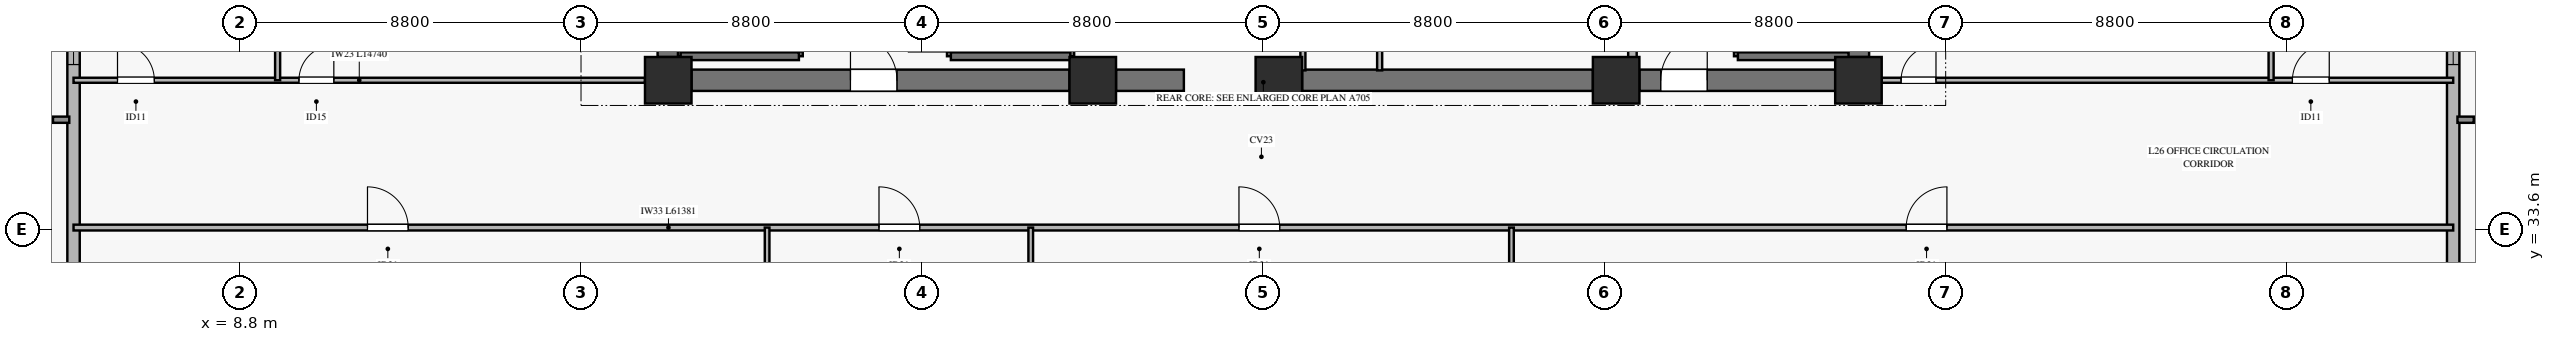
"""IFC4 building model, lengths in metres.
Left out: names, types, materials, properties, quantities, classifications, styles, units other than length and angle.
Written with IfcOpenShell. Run it as: python <this file> out.ifc"""

import sys

from ifc_helpers import new_model, si_unit, direction, frame, frame_2d, origin, origin_2d, place, context, subcontext, project, spatial, rectangle, extrude, source, transform, mapped, element, fill, save


model = new_model("IFC4")
c1 = context("Model", 3, precision=1e-05, world=origin(), true_north=direction((0.0, 1.0)))
c2 = subcontext(c1, "Body", "Model", "MODEL_VIEW")
j1 = project(units=[si_unit("LENGTHUNIT", "METRE"), si_unit("PLANEANGLEUNIT", "RADIAN")], contexts=[c1])
p1 = place(None, origin())
s1 = spatial("IfcSite", under=j1, at=p1, CompositionType="ELEMENT")
p2 = place(p1, origin())
s2 = spatial("IfcBuilding", under=s1, at=p2, CompositionType="ELEMENT")
p3 = place(p2, frame((0.0, 0.0, 107.5)))
s3 = spatial("IfcBuildingStorey", under=s2, at=p3, CompositionType="ELEMENT", Elevation=107.5)
m1 = source(origin(), c2, "Body", "SweptSolid", [
    extrude(rectangle(XDim=1.2, YDim=1.2, at=origin_2d()), origin(), (0.0, 0.0, 1.0), 3.68),
])
for number, where, z_axis, x_axis in (
    (1, (19.85, 37.45, 0.0), (0.0, 0.0, 1.0), (1.0, 0.0, 0.0)),
    (2, (30.8, 37.45, 0.0), (0.0, 0.0, 1.0), (1.0, 0.0, 0.0)),
    (3, (35.6, 37.45, 0.0), (0.0, 0.0, 1.0), (1.0, 0.0, 0.0)),
    (4, (44.3, 37.45, 0.0), (0.0, 0.0, 1.0), (1.0, 0.0, 0.0)),
    (5, (50.55, 37.45, 0.0), (0.0, 0.0, 1.0), (1.0, 0.0, 0.0)),
):
    element("IfcColumn", number, at=place(p3, frame(where, z_axis=z_axis, x_axis=x_axis)), inside=s3, PredefinedType="PILASTER", context=c2, shape_type="MappedRepresentation", body=[
        mapped(m1, transform((0.0, 0.0, 0.0), x_axis=(1.0, 0.0, 0.0), y_axis=(0.0, 1.0, 0.0), z_axis=(0.0, 0.0, 1.0), scale=1.0)),
    ])
p4 = place(p3, frame((20.45, 37.45, 0.0), z_axis=(0.0, 0.0, 1.0), x_axis=(1.0, 0.0, 0.0)))
e6 = element("IfcWall", 6, at=p4, inside=s3, PredefinedType="SHEAR", context=c2, shape_type="SweptSolid", body=[
    extrude(rectangle(XDim=9.75, YDim=0.55, at=frame_2d((4.875, 0.0))), origin(), (0.0, 0.0, 1.0), 3.68),
])
p5 = place(p4, frame((4.1, 0.0, 0.0)))
e7 = element("IfcOpeningElement", 7, at=p5, cuts=e6, PredefinedType="OPENING", context=c2, shape_type="SweptSolid", body=[
    extrude(rectangle(XDim=1.2, YDim=2.15, at=frame_2d((0.6, 1.075))), frame((0.0, 0.285, 0.0), z_axis=(0.0, -1.0, 0.0), x_axis=(1.0, 0.0, 0.0)), (0.0, 0.0, 1.0), 0.57),
])
p6 = place(p3, frame((31.4, 37.45, 0.0), z_axis=(0.0, 0.0, 1.0), x_axis=(1.0, 0.0, 0.0)))
e8 = element("IfcWall", 8, at=p6, inside=s3, PredefinedType="SHEAR", context=c2, shape_type="SweptSolid", body=[
    extrude(rectangle(XDim=1.75, YDim=0.55, at=frame_2d((0.875, 0.0))), origin(), (0.0, 0.0, 1.0), 3.68),
])
p7 = place(p3, frame((36.2, 37.45, 0.0), z_axis=(0.0, 0.0, 1.0), x_axis=(1.0, 0.0, 0.0)))
e9 = element("IfcWall", 9, at=p7, inside=s3, PredefinedType="SHEAR", context=c2, shape_type="SweptSolid", body=[
    extrude(rectangle(XDim=7.5, YDim=0.55, at=frame_2d((3.75, 0.0))), origin(), (0.0, 0.0, 1.0), 3.68),
])
p8 = place(p3, frame((44.9, 37.45, 0.0), z_axis=(0.0, 0.0, 1.0), x_axis=(1.0, 0.0, 0.0)))
e10 = element("IfcWall", 10, at=p8, inside=s3, PredefinedType="SHEAR", context=c2, shape_type="SweptSolid", body=[
    extrude(rectangle(XDim=5.05, YDim=0.55, at=frame_2d((2.525, 0.0))), origin(), (0.0, 0.0, 1.0), 3.68),
])
p9 = place(p8, frame((0.55, 0.0, 0.0)))
e11 = element("IfcOpeningElement", 11, at=p9, cuts=e10, PredefinedType="OPENING", context=c2, shape_type="SweptSolid", body=[
    extrude(rectangle(XDim=1.2, YDim=2.15, at=frame_2d((0.6, 1.075))), frame((0.0, 0.285, 0.0), z_axis=(0.0, -1.0, 0.0), x_axis=(1.0, 0.0, 0.0)), (0.0, 0.0, 1.0), 0.57),
])
for number, where, z_axis, x_axis in (
    (12, (19.85, 38.05, 0.0), (0.0, 0.0, 1.0), (0.0, 1.0, 0.0)),
    (13, (50.55, 38.05, 0.0), (0.0, 0.0, 1.0), (0.0, 1.0, 0.0)),
):
    element("IfcWall", number, at=place(p3, frame(where, z_axis=z_axis, x_axis=x_axis)), inside=s3, PredefinedType="SHEAR", context=c2, shape_type="SweptSolid", body=[
        extrude(rectangle(XDim=7.9, YDim=0.55, at=frame_2d((3.95, 0.0))), origin(), (0.0, 0.0, 1.0), 3.68),
    ])
p10 = place(p3, frame((4.51, 26.73, 0.0), z_axis=(0.0, 0.0, 1.0), x_axis=(0.0, 1.0, 0.0)))
e14 = element("IfcWall", 14, at=p10, inside=s3, PredefinedType="SOLIDWALL", context=c2, shape_type="SweptSolid", body=[
    extrude(rectangle(XDim=16.326, YDim=0.32, at=frame_2d((8.163, 0.0))), origin(), (0.0, 0.0, 1.0), 3.16),
])
p11 = place(p10, frame((11.125, 0.0, 0.45)))
e15 = element("IfcOpeningElement", 15, at=p11, cuts=e14, PredefinedType="OPENING", context=c2, shape_type="SweptSolid", body=[
    extrude(rectangle(XDim=2.4, YDim=2.1, at=frame_2d((1.2, 1.05))), frame((0.0, 0.17, 0.0), z_axis=(0.0, -1.0, 0.0), x_axis=(1.0, 0.0, 0.0)), (0.0, 0.0, 1.0), 0.34),
])
p12 = place(p3, frame((65.891, 26.73, 0.0), z_axis=(0.0, 0.0, 1.0), x_axis=(0.0, 1.0, 0.0)))
e16 = element("IfcWall", 16, at=p12, inside=s3, PredefinedType="SOLIDWALL", context=c2, shape_type="SweptSolid", body=[
    extrude(rectangle(XDim=16.326, YDim=0.32, at=frame_2d((8.163, 0.0))), origin(), (0.0, 0.0, 1.0), 3.16),
])
p13 = place(p12, frame((11.125, 0.0, 0.45)))
e17 = element("IfcOpeningElement", 17, at=p13, cuts=e16, PredefinedType="OPENING", context=c2, shape_type="SweptSolid", body=[
    extrude(rectangle(XDim=2.4, YDim=2.1, at=frame_2d((1.2, 1.05))), frame((0.0, 0.17, 0.0), z_axis=(0.0, -1.0, 0.0), x_axis=(1.0, 0.0, 0.0)), (0.0, 0.0, 1.0), 0.34),
])
p14 = place(p3, frame((20.17, 38.07, 0.0), z_axis=(0.0, 0.0, 1.0), x_axis=(0.0, 1.0, 0.0)))
e18 = element("IfcWall", 18, at=p14, inside=s3, PredefinedType="SOLIDWALL", context=c2, shape_type="SweptSolid", body=[
    extrude(rectangle(XDim=7.25, YDim=0.14, at=frame_2d((3.625, 0.0))), origin(), (0.0, 0.0, 1.0), 3.9),
])
p15 = place(p3, frame((23.22, 38.07, 0.0), z_axis=(0.0, 0.0, 1.0), x_axis=(0.0, 1.0, 0.0)))
e19 = element("IfcWall", 19, at=p15, inside=s3, PredefinedType="SOLIDWALL", context=c2, shape_type="SweptSolid", body=[
    extrude(rectangle(XDim=7.25, YDim=0.2, at=frame_2d((3.625, 0.0))), origin(), (0.0, 0.0, 1.0), 3.9),
])
p16 = place(p15, frame((0.11, 0.0, 0.0)))
e20 = element("IfcOpeningElement", 20, at=p16, cuts=e19, PredefinedType="OPENING", context=c2, shape_type="SweptSolid", body=[
    extrude(rectangle(XDim=1.1, YDim=2.15, at=frame_2d((0.55, 1.075))), frame((0.0, 0.11, 0.0), z_axis=(0.0, -1.0, 0.0), x_axis=(1.0, 0.0, 0.0)), (0.0, 0.0, 1.0), 0.22),
])
p17 = place(p3, frame((20.17, 38.07, 0.0), z_axis=(0.0, 0.0, 1.0), x_axis=(1.0, 0.0, 0.0)))
e21 = element("IfcWall", 21, at=p17, inside=s3, PredefinedType="SOLIDWALL", context=c2, shape_type="SweptSolid", body=[
    extrude(rectangle(XDim=3.05, YDim=0.2, at=frame_2d((1.525, 0.0))), origin(), (0.0, 0.0, 1.0), 3.9),
])
p18 = place(p3, frame((27.14, 38.07, 0.0), z_axis=(0.0, 0.0, 1.0), x_axis=(0.0, 1.0, 0.0)))
e22 = element("IfcWall", 22, at=p18, inside=s3, PredefinedType="SOLIDWALL", context=c2, shape_type="SweptSolid", body=[
    extrude(rectangle(XDim=7.25, YDim=0.2, at=frame_2d((3.625, 0.0))), origin(), (0.0, 0.0, 1.0), 3.9),
])
p19 = place(p18, frame((0.11, 0.0, 0.0)))
e23 = element("IfcOpeningElement", 23, at=p19, cuts=e22, PredefinedType="OPENING", context=c2, shape_type="SweptSolid", body=[
    extrude(rectangle(XDim=1.1, YDim=2.15, at=frame_2d((0.55, 1.075))), frame((0.0, 0.11, 0.0), z_axis=(0.0, -1.0, 0.0), x_axis=(1.0, 0.0, 0.0)), (0.0, 0.0, 1.0), 0.22),
])
p20 = place(p3, frame((30.22, 38.07, 0.0), z_axis=(0.0, 0.0, 1.0), x_axis=(0.0, 1.0, 0.0)))
e24 = element("IfcWall", 24, at=p20, inside=s3, PredefinedType="SOLIDWALL", context=c2, shape_type="SweptSolid", body=[
    extrude(rectangle(XDim=7.25, YDim=0.2, at=frame_2d((3.625, 0.0))), origin(), (0.0, 0.0, 1.0), 3.9),
])
p21 = place(p3, frame((27.14, 38.07, 0.0), z_axis=(0.0, 0.0, 1.0), x_axis=(1.0, 0.0, 0.0)))
e25 = element("IfcWall", 25, at=p21, inside=s3, PredefinedType="SOLIDWALL", context=c2, shape_type="SweptSolid", body=[
    extrude(rectangle(XDim=3.08, YDim=0.2, at=frame_2d((1.54, 0.0))), origin(), (0.0, 0.0, 1.0), 3.9),
])
p22 = place(p3, frame((47.44, 38.07, 0.0), z_axis=(0.0, 0.0, 1.0), x_axis=(0.0, 1.0, 0.0)))
e26 = element("IfcWall", 26, at=p22, inside=s3, PredefinedType="SOLIDWALL", context=c2, shape_type="SweptSolid", body=[
    extrude(rectangle(XDim=7.25, YDim=0.2, at=frame_2d((3.625, 0.0))), origin(), (0.0, 0.0, 1.0), 3.9),
])
p23 = place(p22, frame((0.11, 0.0, 0.0)))
e27 = element("IfcOpeningElement", 27, at=p23, cuts=e26, PredefinedType="OPENING", context=c2, shape_type="SweptSolid", body=[
    extrude(rectangle(XDim=1.1, YDim=2.15, at=frame_2d((0.55, 1.075))), frame((0.0, 0.11, 0.0), z_axis=(0.0, -1.0, 0.0), x_axis=(1.0, 0.0, 0.0)), (0.0, 0.0, 1.0), 0.22),
])
p24 = place(p3, frame((47.44, 38.07, 0.0), z_axis=(0.0, 0.0, 1.0), x_axis=(1.0, 0.0, 0.0)))
e28 = element("IfcWall", 28, at=p24, inside=s3, PredefinedType="SOLIDWALL", context=c2, shape_type="SweptSolid", body=[
    extrude(rectangle(XDim=2.855, YDim=0.2, at=frame_2d((1.427, 0.0))), origin(), (0.0, 0.0, 1.0), 3.9),
])
p25 = place(p3, frame((44.72, 37.705, 0.0), z_axis=(0.0, 0.0, 1.0), x_axis=(0.0, 1.0, 0.0)))
e29 = element("IfcWall", 29, at=p25, inside=s3, PredefinedType="SOLIDWALL", context=c2, shape_type="SweptSolid", body=[
    extrude(rectangle(XDim=7.515, YDim=0.22, at=frame_2d((3.757, 0.0))), origin(), (0.0, 0.0, 1.0), 3.68),
])
p26 = place(p3, frame((36.22, 37.705, 0.0), z_axis=(0.0, 0.0, 1.0), x_axis=(0.0, 1.0, 0.0)))
e30 = element("IfcWall", 30, at=p26, inside=s3, PredefinedType="PARTITIONING", context=c2, shape_type="SweptSolid", body=[
    extrude(rectangle(XDim=2.215, YDim=0.13, at=frame_2d((1.107, 0.0))), origin(), (0.0, 0.0, 1.0), 3.68),
])
p27 = place(p26, frame((0.905, 0.0, 0.0)))
e31 = element("IfcOpeningElement", 31, at=p27, cuts=e30, PredefinedType="OPENING", context=c2, shape_type="SweptSolid", body=[
    extrude(rectangle(XDim=0.9, YDim=2.1, at=frame_2d((0.45, 1.05))), frame((0.0, 0.075, 0.0), z_axis=(0.0, -1.0, 0.0), x_axis=(1.0, 0.0, 0.0)), (0.0, 0.0, 1.0), 0.15),
])
p28 = place(p3, frame((38.2, 37.705, 0.0), z_axis=(0.0, 0.0, 1.0), x_axis=(0.0, 1.0, 0.0)))
e32 = element("IfcWall", 32, at=p28, inside=s3, PredefinedType="PARTITIONING", context=c2, shape_type="SweptSolid", body=[
    extrude(rectangle(XDim=2.215, YDim=0.13, at=frame_2d((1.107, 0.0))), origin(), (0.0, 0.0, 1.0), 3.68),
])
p29 = place(p28, frame((0.615, 0.0, 0.0)))
e33 = element("IfcOpeningElement", 33, at=p29, cuts=e32, PredefinedType="OPENING", context=c2, shape_type="SweptSolid", body=[
    extrude(rectangle(XDim=0.9, YDim=2.1, at=frame_2d((0.45, 1.05))), frame((0.0, 0.075, 0.0), z_axis=(0.0, -1.0, 0.0), x_axis=(1.0, 0.0, 0.0)), (0.0, 0.0, 1.0), 0.15),
])
p30 = place(p3, frame((4.51, 33.65, 0.0), z_axis=(0.0, 0.0, 1.0), x_axis=(1.0, 0.0, 0.0)))
e34 = element("IfcWall", 34, at=p30, inside=s3, PredefinedType="PARTITIONING", context=c2, shape_type="SweptSolid", body=[
    extrude(rectangle(XDim=61.381, YDim=0.15, at=frame_2d((30.69, 0.0))), origin(), (0.0, 0.0, 1.0), 2.765),
])
p31 = place(p30, frame((7.582, 0.0, 0.0)))
e35 = element("IfcOpeningElement", 35, at=p31, cuts=e34, PredefinedType="OPENING", context=c2, shape_type="SweptSolid", body=[
    extrude(rectangle(XDim=1.05, YDim=2.15, at=frame_2d((0.525, 1.075))), frame((0.0, 0.085, 0.0), z_axis=(0.0, -1.0, 0.0), x_axis=(1.0, 0.0, 0.0)), (0.0, 0.0, 1.0), 0.17),
])
p32 = place(p30, frame((20.776, 0.0, 0.0)))
e36 = element("IfcOpeningElement", 36, at=p32, cuts=e34, PredefinedType="OPENING", context=c2, shape_type="SweptSolid", body=[
    extrude(rectangle(XDim=1.05, YDim=2.15, at=frame_2d((0.525, 1.075))), frame((0.0, 0.085, 0.0), z_axis=(0.0, -1.0, 0.0), x_axis=(1.0, 0.0, 0.0)), (0.0, 0.0, 1.0), 0.17),
])
p33 = place(p30, frame((30.061, 0.0, 0.0)))
e37 = element("IfcOpeningElement", 37, at=p33, cuts=e34, PredefinedType="OPENING", context=c2, shape_type="SweptSolid", body=[
    extrude(rectangle(XDim=1.05, YDim=2.15, at=frame_2d((0.525, 1.075))), frame((0.0, 0.085, 0.0), z_axis=(0.0, -1.0, 0.0), x_axis=(1.0, 0.0, 0.0)), (0.0, 0.0, 1.0), 0.17),
])
p34 = place(p30, frame((47.272, 0.0, 0.0)))
e38 = element("IfcOpeningElement", 38, at=p34, cuts=e34, PredefinedType="OPENING", context=c2, shape_type="SweptSolid", body=[
    extrude(rectangle(XDim=1.05, YDim=2.15, at=frame_2d((0.525, 1.075))), frame((0.0, 0.085, 0.0), z_axis=(0.0, -1.0, 0.0), x_axis=(1.0, 0.0, 0.0)), (0.0, 0.0, 1.0), 0.17),
])
for number, where, z_axis, x_axis in (
    (39, (22.4, 6.462, 0.0), (0.0, 0.0, 1.0), (0.0, 1.0, 0.0)),
    (40, (29.2, 6.462, 0.0), (0.0, 0.0, 1.0), (0.0, 1.0, 0.0)),
    (41, (41.6, 6.462, 0.0), (0.0, 0.0, 1.0), (0.0, 1.0, 0.0)),
):
    element("IfcWall", number, at=place(p3, frame(where, z_axis=z_axis, x_axis=x_axis)), inside=s3, PredefinedType="PARTITIONING", context=c2, shape_type="SweptSolid", body=[
        extrude(rectangle(XDim=27.188, YDim=0.12, at=frame_2d((13.594, 0.0))), origin(), (0.0, 0.0, 1.0), 3.165),
    ])
p35 = place(p3, frame((4.51, 37.45, 0.0), z_axis=(0.0, 0.0, 1.0), x_axis=(1.0, 0.0, 0.0)))
e42 = element("IfcWall", 42, at=p35, inside=s3, PredefinedType="PARTITIONING", context=c2, shape_type="SweptSolid", body=[
    extrude(rectangle(XDim=14.74, YDim=0.13, at=frame_2d((7.37, 0.0))), origin(), (0.0, 0.0, 1.0), 3.165),
])
p36 = place(p35, frame((1.134, 0.0, 0.0)))
e43 = element("IfcOpeningElement", 43, at=p36, cuts=e42, PredefinedType="OPENING", context=c2, shape_type="SweptSolid", body=[
    extrude(rectangle(XDim=0.95, YDim=2.1, at=frame_2d((0.475, 1.05))), frame((0.0, 0.075, 0.0), z_axis=(0.0, -1.0, 0.0), x_axis=(1.0, 0.0, 0.0)), (0.0, 0.0, 1.0), 0.15),
])
p37 = place(p35, frame((5.814, 0.0, 0.0)))
e44 = element("IfcOpeningElement", 44, at=p37, cuts=e42, PredefinedType="OPENING", context=c2, shape_type="SweptSolid", body=[
    extrude(rectangle(XDim=0.9, YDim=2.1, at=frame_2d((0.45, 1.05))), frame((0.0, 0.075, 0.0), z_axis=(0.0, -1.0, 0.0), x_axis=(1.0, 0.0, 0.0)), (0.0, 0.0, 1.0), 0.15),
])
p38 = place(p3, frame((9.774, 37.45, 0.0), z_axis=(0.0, 0.0, 1.0), x_axis=(0.0, 1.0, 0.0)))
e45 = element("IfcWall", 45, at=p38, inside=s3, PredefinedType="PARTITIONING", context=c2, shape_type="SweptSolid", body=[
    extrude(rectangle(XDim=8.8, YDim=0.13, at=frame_2d((4.4, 0.0))), origin(), (0.0, 0.0, 1.0), 3.68),
])
p39 = place(p3, frame((51.15, 37.45, 0.0), z_axis=(0.0, 0.0, 1.0), x_axis=(1.0, 0.0, 0.0)))
e46 = element("IfcWall", 46, at=p39, inside=s3, PredefinedType="PARTITIONING", context=c2, shape_type="SweptSolid", body=[
    extrude(rectangle(XDim=14.741, YDim=0.13, at=frame_2d((7.371, 0.0))), origin(), (0.0, 0.0, 1.0), 3.165),
])
p40 = place(p39, frame((0.5, 0.0, 0.0)))
e47 = element("IfcOpeningElement", 47, at=p40, cuts=e46, PredefinedType="OPENING", context=c2, shape_type="SweptSolid", body=[
    extrude(rectangle(XDim=0.9, YDim=2.1, at=frame_2d((0.45, 1.05))), frame((0.0, 0.075, 0.0), z_axis=(0.0, -1.0, 0.0), x_axis=(1.0, 0.0, 0.0)), (0.0, 0.0, 1.0), 0.15),
])
p41 = place(p39, frame((10.594, 0.0, 0.0)))
e48 = element("IfcOpeningElement", 48, at=p41, cuts=e46, PredefinedType="OPENING", context=c2, shape_type="SweptSolid", body=[
    extrude(rectangle(XDim=0.95, YDim=2.1, at=frame_2d((0.475, 1.05))), frame((0.0, 0.075, 0.0), z_axis=(0.0, -1.0, 0.0), x_axis=(1.0, 0.0, 0.0)), (0.0, 0.0, 1.0), 0.15),
])
p42 = place(p3, frame((61.194, 37.45, 0.0), z_axis=(0.0, 0.0, 1.0), x_axis=(0.0, 1.0, 0.0)))
e49 = element("IfcWall", 49, at=p42, inside=s3, PredefinedType="PARTITIONING", context=c2, shape_type="SweptSolid", body=[
    extrude(rectangle(XDim=8.8, YDim=0.13, at=frame_2d((4.4, 0.0))), origin(), (0.0, 0.0, 1.0), 3.68),
])
m2 = source(origin(), c2, "Body", "SweptSolid", [
    extrude(rectangle(XDim=2.4, YDim=2.1, at=frame_2d((1.2, 1.05))), frame((0.0, 0.03, 0.0), z_axis=(0.0, -1.0, 0.0), x_axis=(1.0, 0.0, 0.0)), (0.0, 0.0, 1.0), 0.06),
])
p43 = place(p11, origin())
e50 = element("IfcWindow", 50, at=p43, inside=s3, PartitioningType="SINGLE_PANEL", PredefinedType="WINDOW", context=c2, shape_type="MappedRepresentation", body=[
    mapped(m2, transform((0.0, 0.0, 0.0), x_axis=(1.0, 0.0, 0.0), y_axis=(0.0, 1.0, 0.0), z_axis=(0.0, 0.0, 1.0), scale=1.0)),
])
fill(e15, e50)
p44 = place(p13, origin())
e51 = element("IfcWindow", 51, at=p44, inside=s3, PartitioningType="SINGLE_PANEL", PredefinedType="WINDOW", context=c2, shape_type="MappedRepresentation", body=[
    mapped(m2, transform((0.0, 0.0, 0.0), x_axis=(1.0, 0.0, 0.0), y_axis=(0.0, 1.0, 0.0), z_axis=(0.0, 0.0, 1.0), scale=1.0)),
])
fill(e17, e51)
m3 = source(origin(), c2, "Body", "SweptSolid", [
    extrude(rectangle(XDim=1.2, YDim=2.15, at=frame_2d((0.6, 1.075))), frame((0.0, 0.025, 0.0), z_axis=(0.0, -1.0, 0.0), x_axis=(1.0, 0.0, 0.0)), (0.0, 0.0, 1.0), 0.05),
])
p45 = place(p5, origin())
e52 = element("IfcDoor", 52, at=p45, inside=s3, OperationType="SINGLE_SWING_LEFT", PredefinedType="DOOR", context=c2, shape_type="MappedRepresentation", body=[
    mapped(m3, transform((0.0, 0.0, 0.0), x_axis=(1.0, 0.0, 0.0), y_axis=(0.0, 1.0, 0.0), z_axis=(0.0, 0.0, 1.0), scale=1.0)),
])
fill(e7, e52)
p46 = place(p9, origin())
e53 = element("IfcDoor", 53, at=p46, inside=s3, OperationType="SINGLE_SWING_RIGHT", PredefinedType="DOOR", context=c2, shape_type="MappedRepresentation", body=[
    mapped(m3, transform((0.0, 0.0, 0.0), x_axis=(1.0, 0.0, 0.0), y_axis=(0.0, 1.0, 0.0), z_axis=(0.0, 0.0, 1.0), scale=1.0)),
])
fill(e11, e53)
m4 = source(origin(), c2, "Body", "SweptSolid", [
    extrude(rectangle(XDim=1.05, YDim=2.15, at=frame_2d((0.525, 1.075))), frame((0.0, 0.025, 0.0), z_axis=(0.0, -1.0, 0.0), x_axis=(1.0, 0.0, 0.0)), (0.0, 0.0, 1.0), 0.05),
])
p47 = place(p31, origin())
e54 = element("IfcDoor", 54, at=p47, inside=s3, OperationType="SINGLE_SWING_LEFT", PredefinedType="DOOR", context=c2, shape_type="MappedRepresentation", body=[
    mapped(m4, transform((0.0, 0.0, 0.0), x_axis=(1.0, 0.0, 0.0), y_axis=(0.0, 1.0, 0.0), z_axis=(0.0, 0.0, 1.0), scale=1.0)),
])
fill(e35, e54)
p48 = place(p32, origin())
e55 = element("IfcDoor", 55, at=p48, inside=s3, OperationType="SINGLE_SWING_LEFT", PredefinedType="DOOR", context=c2, shape_type="MappedRepresentation", body=[
    mapped(m4, transform((0.0, 0.0, 0.0), x_axis=(1.0, 0.0, 0.0), y_axis=(0.0, 1.0, 0.0), z_axis=(0.0, 0.0, 1.0), scale=1.0)),
])
fill(e36, e55)
p49 = place(p33, origin())
e56 = element("IfcDoor", 56, at=p49, inside=s3, OperationType="SINGLE_SWING_LEFT", PredefinedType="DOOR", context=c2, shape_type="MappedRepresentation", body=[
    mapped(m4, transform((0.0, 0.0, 0.0), x_axis=(1.0, 0.0, 0.0), y_axis=(0.0, 1.0, 0.0), z_axis=(0.0, 0.0, 1.0), scale=1.0)),
])
fill(e37, e56)
p50 = place(p34, origin())
e57 = element("IfcDoor", 57, at=p50, inside=s3, OperationType="SINGLE_SWING_RIGHT", PredefinedType="DOOR", context=c2, shape_type="MappedRepresentation", body=[
    mapped(m4, transform((0.0, 0.0, 0.0), x_axis=(1.0, 0.0, 0.0), y_axis=(0.0, 1.0, 0.0), z_axis=(0.0, 0.0, 1.0), scale=1.0)),
])
fill(e38, e57)
m5 = source(origin(), c2, "Body", "SweptSolid", [
    extrude(rectangle(XDim=0.95, YDim=2.1, at=frame_2d((0.475, 1.05))), frame((0.0, 0.025, 0.0), z_axis=(0.0, -1.0, 0.0), x_axis=(1.0, 0.0, 0.0)), (0.0, 0.0, 1.0), 0.05),
])
p51 = place(p36, origin())
e58 = element("IfcDoor", 58, at=p51, inside=s3, OperationType="SINGLE_SWING_LEFT", PredefinedType="DOOR", context=c2, shape_type="MappedRepresentation", body=[
    mapped(m5, transform((0.0, 0.0, 0.0), x_axis=(1.0, 0.0, 0.0), y_axis=(0.0, 1.0, 0.0), z_axis=(0.0, 0.0, 1.0), scale=1.0)),
])
fill(e43, e58)
m6 = source(origin(), c2, "Body", "SweptSolid", [
    extrude(rectangle(XDim=0.9, YDim=2.1, at=frame_2d((0.45, 1.05))), frame((0.0, 0.025, 0.0), z_axis=(0.0, -1.0, 0.0), x_axis=(1.0, 0.0, 0.0)), (0.0, 0.0, 1.0), 0.05),
])
p52 = place(p37, origin())
e59 = element("IfcDoor", 59, at=p52, inside=s3, OperationType="SINGLE_SWING_RIGHT", PredefinedType="DOOR", context=c2, shape_type="MappedRepresentation", body=[
    mapped(m6, transform((0.0, 0.0, 0.0), x_axis=(1.0, 0.0, 0.0), y_axis=(0.0, 1.0, 0.0), z_axis=(0.0, 0.0, 1.0), scale=1.0)),
])
fill(e44, e59)
p53 = place(p40, origin())
e60 = element("IfcDoor", 60, at=p53, inside=s3, OperationType="SINGLE_SWING_RIGHT", PredefinedType="DOOR", context=c2, shape_type="MappedRepresentation", body=[
    mapped(m6, transform((0.0, 0.0, 0.0), x_axis=(1.0, 0.0, 0.0), y_axis=(0.0, 1.0, 0.0), z_axis=(0.0, 0.0, 1.0), scale=1.0)),
])
fill(e47, e60)
p54 = place(p41, origin())
e61 = element("IfcDoor", 61, at=p54, inside=s3, OperationType="SINGLE_SWING_RIGHT", PredefinedType="DOOR", context=c2, shape_type="MappedRepresentation", body=[
    mapped(m5, transform((0.0, 0.0, 0.0), x_axis=(1.0, 0.0, 0.0), y_axis=(0.0, 1.0, 0.0), z_axis=(0.0, 0.0, 1.0), scale=1.0)),
])
fill(e48, e61)
save(model, sys.argv[1])
